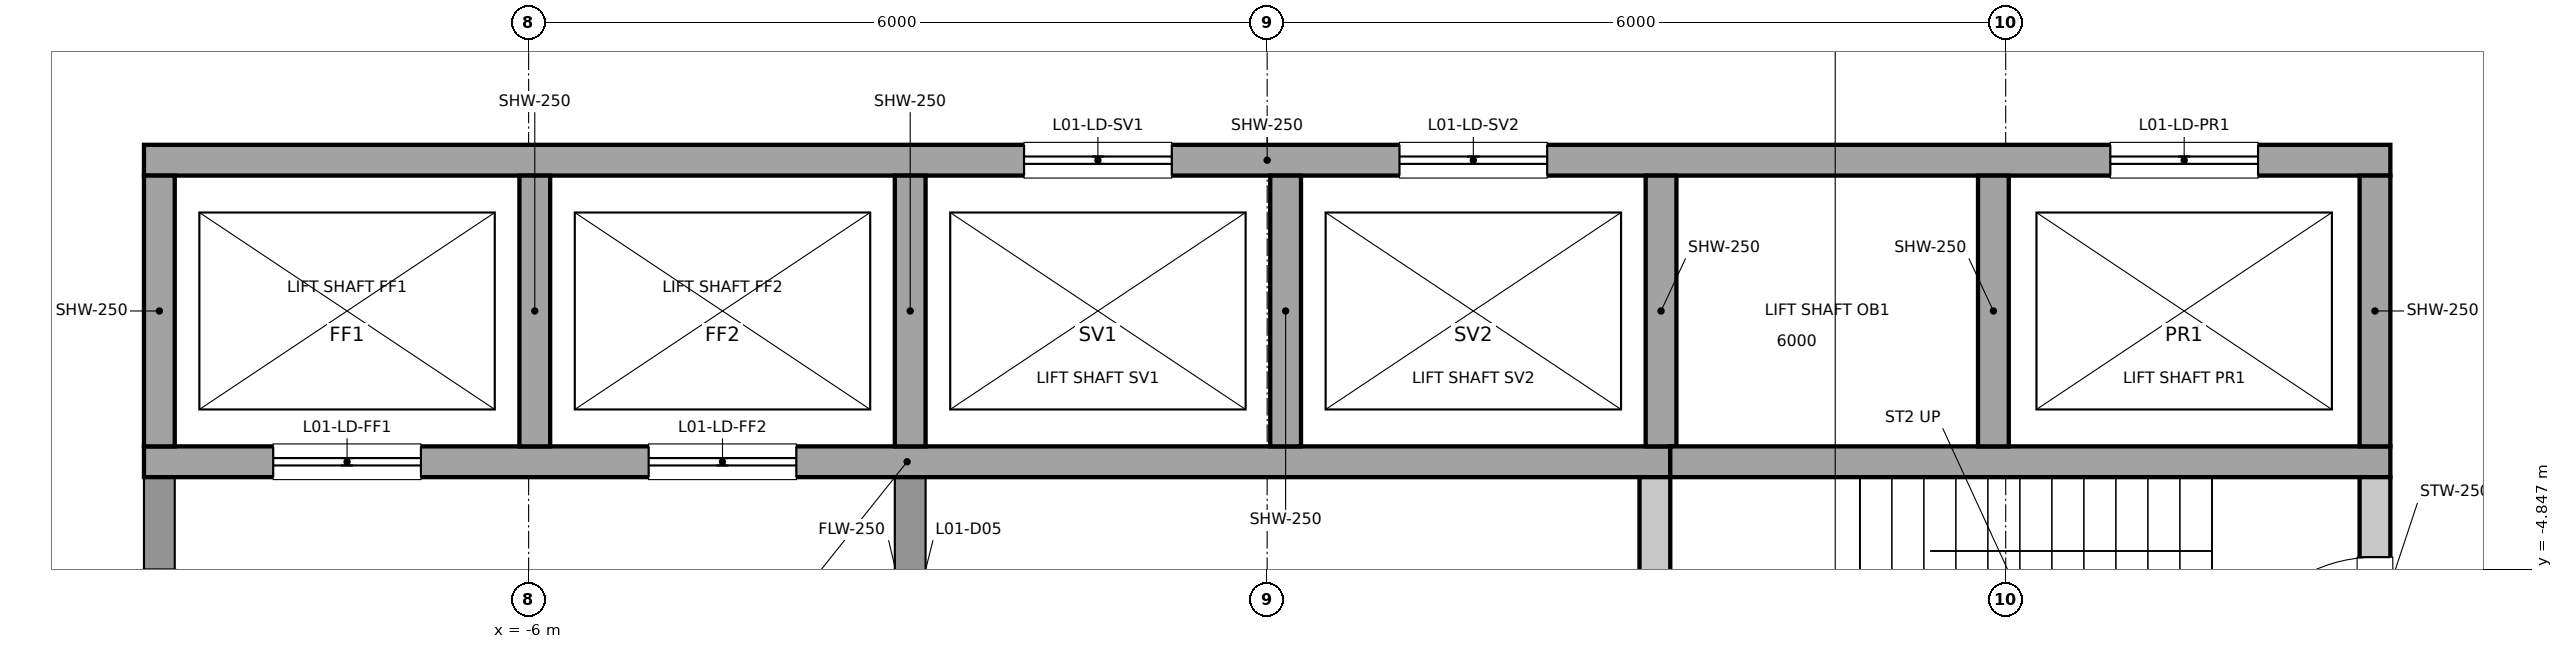
"""IFC4 building model, lengths in metres.
Left out: names, types, materials, properties, quantities, classifications, styles, units other than length and angle.
Written with IfcOpenShell. Run it as: python <this file> out.ifc"""

import sys

from ifc_helpers import new_model, si_unit, direction, frame, frame_2d, origin, place, context, subcontext, project, spatial, rectangle, extrude, element, fill, save


model = new_model("IFC4")
c1 = context("Model", 3, precision=1e-05, world=origin(), true_north=direction((0.0, 1.0)))
c2 = subcontext(c1, "Body", "Model", "MODEL_VIEW")
j1 = project(units=[si_unit("LENGTHUNIT", "METRE"), si_unit("PLANEANGLEUNIT", "RADIAN")], contexts=[c1])
p1 = place(None, origin())
s1 = spatial("IfcSite", under=j1, at=p1, CompositionType="ELEMENT")
p2 = place(p1, origin())
s2 = spatial("IfcBuilding", under=s1, at=p2, CompositionType="ELEMENT")
p3 = place(p2, frame((0.0, 0.0, 8.0)))
s3 = spatial("IfcBuildingStorey", under=s2, at=p3, CompositionType="ELEMENT", Elevation=8.0)
p4 = place(p3, frame((9.0, -6.6, 0.0), z_axis=(0.0, 0.0, 1.0), x_axis=(0.0, 1.0, 0.0)))
e1 = element("IfcWall", 1, at=p4, inside=s3, PredefinedType="SOLIDWALL", context=c2, shape_type="SweptSolid", body=[
    extrude(rectangle(XDim=2.5, YDim=0.25, at=frame_2d((1.25, 0.0))), origin(), (0.0, 0.0, 1.0), 8.8),
])
p5 = place(p4, frame((0.65, 0.0, 0.0)))
e2 = element("IfcOpeningElement", 2, at=p5, cuts=e1, PredefinedType="OPENING", context=c2, shape_type="SweptSolid", body=[
    extrude(rectangle(XDim=1.2, YDim=2.1, at=frame_2d((0.6, 1.05))), frame((0.0, 0.125, 0.0), z_axis=(0.0, -1.0, 0.0), x_axis=(1.0, 0.0, 0.0)), (0.0, 0.0, 1.0), 0.25),
])
p6 = place(p3, frame((-9.0, -6.6, 0.0), z_axis=(0.0, 0.0, 1.0), x_axis=(0.0, 1.0, 0.0)))
e3 = element("IfcWall", 3, at=p6, inside=s3, PredefinedType="PARTITIONING", context=c2, shape_type="SweptSolid", body=[
    extrude(rectangle(XDim=2.5, YDim=0.25, at=frame_2d((1.25, 0.0))), origin(), (0.0, 0.0, 1.0), 8.8),
])
p7 = place(p6, frame((0.75, 0.0, 0.0)))
e4 = element("IfcOpeningElement", 4, at=p7, cuts=e3, PredefinedType="OPENING", context=c2, shape_type="SweptSolid", body=[
    extrude(rectangle(XDim=1.0, YDim=2.1, at=frame_2d((0.5, 1.05))), frame((0.0, 0.125, 0.0), z_axis=(0.0, -1.0, 0.0), x_axis=(1.0, 0.0, 0.0)), (0.0, 0.0, 1.0), 0.25),
])
p8 = place(p3, frame((3.15, -6.6, 0.0), z_axis=(0.0, 0.0, 1.0), x_axis=(0.0, 1.0, 0.0)))
e5 = element("IfcWall", 5, at=p8, inside=s3, PredefinedType="SOLIDWALL", context=c2, shape_type="SweptSolid", body=[
    extrude(rectangle(XDim=2.5, YDim=0.25, at=frame_2d((1.25, 0.0))), origin(), (0.0, 0.0, 1.0), 8.8),
])
p9 = place(p3, frame((-2.9, -6.6, 0.0), z_axis=(0.0, 0.0, 1.0), x_axis=(0.0, 1.0, 0.0)))
e6 = element("IfcWall", 6, at=p9, inside=s3, PredefinedType="PARTITIONING", context=c2, shape_type="SweptSolid", body=[
    extrude(rectangle(XDim=2.5, YDim=0.25, at=frame_2d((1.25, 0.0))), origin(), (0.0, 0.0, 1.0), 8.8),
])
p10 = place(p9, frame((0.8, 0.0, 0.0)))
e7 = element("IfcOpeningElement", 7, at=p10, cuts=e6, PredefinedType="OPENING", context=c2, shape_type="SweptSolid", body=[
    extrude(rectangle(XDim=0.9, YDim=2.1, at=frame_2d((0.45, 1.05))), frame((0.0, 0.125, 0.0), z_axis=(0.0, -1.0, 0.0), x_axis=(1.0, 0.0, 0.0)), (0.0, 0.0, 1.0), 0.25),
])
p11 = place(p3, frame((-9.125, -1.525, 0.0), z_axis=(0.0, 0.0, 1.0), x_axis=(1.0, 0.0, 0.0)))
e8 = element("IfcWall", 8, at=p11, inside=s3, PredefinedType="SOLIDWALL", context=c2, shape_type="SweptSolid", body=[
    extrude(rectangle(XDim=18.25, YDim=0.25, at=frame_2d((9.125, 0.0))), origin(), (0.0, 0.0, 1.0), 8.8),
])
p12 = place(p11, frame((7.15, 0.0, 0.0)))
e9 = element("IfcOpeningElement", 9, at=p12, cuts=e8, PredefinedType="OPENING", context=c2, shape_type="SweptSolid", body=[
    extrude(rectangle(XDim=1.2, YDim=2.1, at=frame_2d((0.6, 1.05))), frame((0.0, 0.125, 0.0), z_axis=(0.0, -1.0, 0.0), x_axis=(1.0, 0.0, 0.0)), (0.0, 0.0, 1.0), 0.25),
])
p13 = place(p11, frame((10.2, 0.0, 0.0)))
e10 = element("IfcOpeningElement", 10, at=p13, cuts=e8, PredefinedType="OPENING", context=c2, shape_type="SweptSolid", body=[
    extrude(rectangle(XDim=1.2, YDim=2.1, at=frame_2d((0.6, 1.05))), frame((0.0, 0.125, 0.0), z_axis=(0.0, -1.0, 0.0), x_axis=(1.0, 0.0, 0.0)), (0.0, 0.0, 1.0), 0.25),
])
p14 = place(p11, frame((15.975, 0.0, 0.0)))
e11 = element("IfcOpeningElement", 11, at=p14, cuts=e8, PredefinedType="OPENING", context=c2, shape_type="SweptSolid", body=[
    extrude(rectangle(XDim=1.2, YDim=2.1, at=frame_2d((0.6, 1.05))), frame((0.0, 0.125, 0.0), z_axis=(0.0, -1.0, 0.0), x_axis=(1.0, 0.0, 0.0)), (0.0, 0.0, 1.0), 0.25),
])
p15 = place(p3, frame((-9.125, -3.975, 0.0), z_axis=(0.0, 0.0, 1.0), x_axis=(1.0, 0.0, 0.0)))
e12 = element("IfcWall", 12, at=p15, inside=s3, PredefinedType="SOLIDWALL", context=c2, shape_type="SweptSolid", body=[
    extrude(rectangle(XDim=12.4, YDim=0.25, at=frame_2d((6.2, 0.0))), origin(), (0.0, 0.0, 1.0), 8.8),
])
p16 = place(p15, frame((1.05, 0.0, 0.0)))
e13 = element("IfcOpeningElement", 13, at=p16, cuts=e12, PredefinedType="OPENING", context=c2, shape_type="SweptSolid", body=[
    extrude(rectangle(XDim=1.2, YDim=2.1, at=frame_2d((0.6, 1.05))), frame((0.0, 0.125, 0.0), z_axis=(0.0, -1.0, 0.0), x_axis=(1.0, 0.0, 0.0)), (0.0, 0.0, 1.0), 0.25),
])
p17 = place(p15, frame((4.1, 0.0, 0.0)))
e14 = element("IfcOpeningElement", 14, at=p17, cuts=e12, PredefinedType="OPENING", context=c2, shape_type="SweptSolid", body=[
    extrude(rectangle(XDim=1.2, YDim=2.1, at=frame_2d((0.6, 1.05))), frame((0.0, 0.125, 0.0), z_axis=(0.0, -1.0, 0.0), x_axis=(1.0, 0.0, 0.0)), (0.0, 0.0, 1.0), 0.25),
])
p18 = place(p3, frame((3.275, -3.975, 0.0), z_axis=(0.0, 0.0, 1.0), x_axis=(1.0, 0.0, 0.0)))
e15 = element("IfcWall", 15, at=p18, inside=s3, PredefinedType="SOLIDWALL", context=c2, shape_type="SweptSolid", body=[
    extrude(rectangle(XDim=5.85, YDim=0.25, at=frame_2d((2.925, 0.0))), origin(), (0.0, 0.0, 1.0), 8.8),
])
for number, where, z_axis, x_axis in (
    (16, (-9.0, -3.85, 0.0), (0.0, 0.0, 1.0), (0.0, 1.0, 0.0)),
    (17, (-5.95, -3.85, 0.0), (0.0, 0.0, 1.0), (0.0, 1.0, 0.0)),
    (18, (-2.9, -3.85, 0.0), (0.0, 0.0, 1.0), (0.0, 1.0, 0.0)),
    (19, (0.15, -3.85, 0.0), (0.0, 0.0, 1.0), (0.0, 1.0, 0.0)),
    (20, (3.2, -3.85, 0.0), (0.0, 0.0, 1.0), (0.0, 1.0, 0.0)),
    (21, (5.9, -3.85, 0.0), (0.0, 0.0, 1.0), (0.0, 1.0, 0.0)),
    (22, (9.0, -3.85, 0.0), (0.0, 0.0, 1.0), (0.0, 1.0, 0.0)),
):
    element("IfcWall", number, at=place(p3, frame(where, z_axis=z_axis, x_axis=x_axis)), inside=s3, PredefinedType="SOLIDWALL", context=c2, shape_type="SweptSolid", body=[
        extrude(rectangle(XDim=2.2, YDim=0.25, at=frame_2d((1.1, 0.0))), origin(), (0.0, 0.0, 1.0), 8.8),
    ])
p19 = place(p16, origin())
e23 = element("IfcDoor", 23, at=p19, inside=s3, OperationType="DOUBLE_DOOR_SLIDING", PredefinedType="DOOR", context=c2, shape_type="SweptSolid", body=[
    extrude(rectangle(XDim=1.2, YDim=2.1, at=frame_2d((0.6, 1.05))), frame((0.0, 0.025, 0.0), z_axis=(0.0, -1.0, 0.0), x_axis=(1.0, 0.0, 0.0)), (0.0, 0.0, 1.0), 0.05),
])
fill(e13, e23)
p20 = place(p17, origin())
e24 = element("IfcDoor", 24, at=p20, inside=s3, OperationType="DOUBLE_DOOR_SLIDING", PredefinedType="DOOR", context=c2, shape_type="SweptSolid", body=[
    extrude(rectangle(XDim=1.2, YDim=2.1, at=frame_2d((0.6, 1.05))), frame((0.0, 0.025, 0.0), z_axis=(0.0, -1.0, 0.0), x_axis=(1.0, 0.0, 0.0)), (0.0, 0.0, 1.0), 0.05),
])
fill(e14, e24)
p21 = place(p12, origin())
e25 = element("IfcDoor", 25, at=p21, inside=s3, OperationType="DOUBLE_DOOR_SLIDING", PredefinedType="DOOR", context=c2, shape_type="SweptSolid", body=[
    extrude(rectangle(XDim=1.2, YDim=2.1, at=frame_2d((0.6, 1.05))), frame((0.0, 0.025, 0.0), z_axis=(0.0, -1.0, 0.0), x_axis=(1.0, 0.0, 0.0)), (0.0, 0.0, 1.0), 0.05),
])
fill(e9, e25)
p22 = place(p13, origin())
e26 = element("IfcDoor", 26, at=p22, inside=s3, OperationType="DOUBLE_DOOR_SLIDING", PredefinedType="DOOR", context=c2, shape_type="SweptSolid", body=[
    extrude(rectangle(XDim=1.2, YDim=2.1, at=frame_2d((0.6, 1.05))), frame((0.0, 0.025, 0.0), z_axis=(0.0, -1.0, 0.0), x_axis=(1.0, 0.0, 0.0)), (0.0, 0.0, 1.0), 0.05),
])
fill(e10, e26)
p23 = place(p14, origin())
e27 = element("IfcDoor", 27, at=p23, inside=s3, OperationType="DOUBLE_DOOR_SLIDING", PredefinedType="DOOR", context=c2, shape_type="SweptSolid", body=[
    extrude(rectangle(XDim=1.2, YDim=2.1, at=frame_2d((0.6, 1.05))), frame((0.0, 0.025, 0.0), z_axis=(0.0, -1.0, 0.0), x_axis=(1.0, 0.0, 0.0)), (0.0, 0.0, 1.0), 0.05),
])
fill(e11, e27)
p24 = place(p5, origin())
e28 = element("IfcDoor", 28, at=p24, inside=s3, OperationType="SINGLE_SWING_LEFT", PredefinedType="DOOR", context=c2, shape_type="SweptSolid", body=[
    extrude(rectangle(XDim=1.2, YDim=2.1, at=frame_2d((0.6, 1.05))), frame((0.0, 0.025, 0.0), z_axis=(0.0, -1.0, 0.0), x_axis=(1.0, 0.0, 0.0)), (0.0, 0.0, 1.0), 0.05),
])
fill(e2, e28)
save(model, sys.argv[1])
